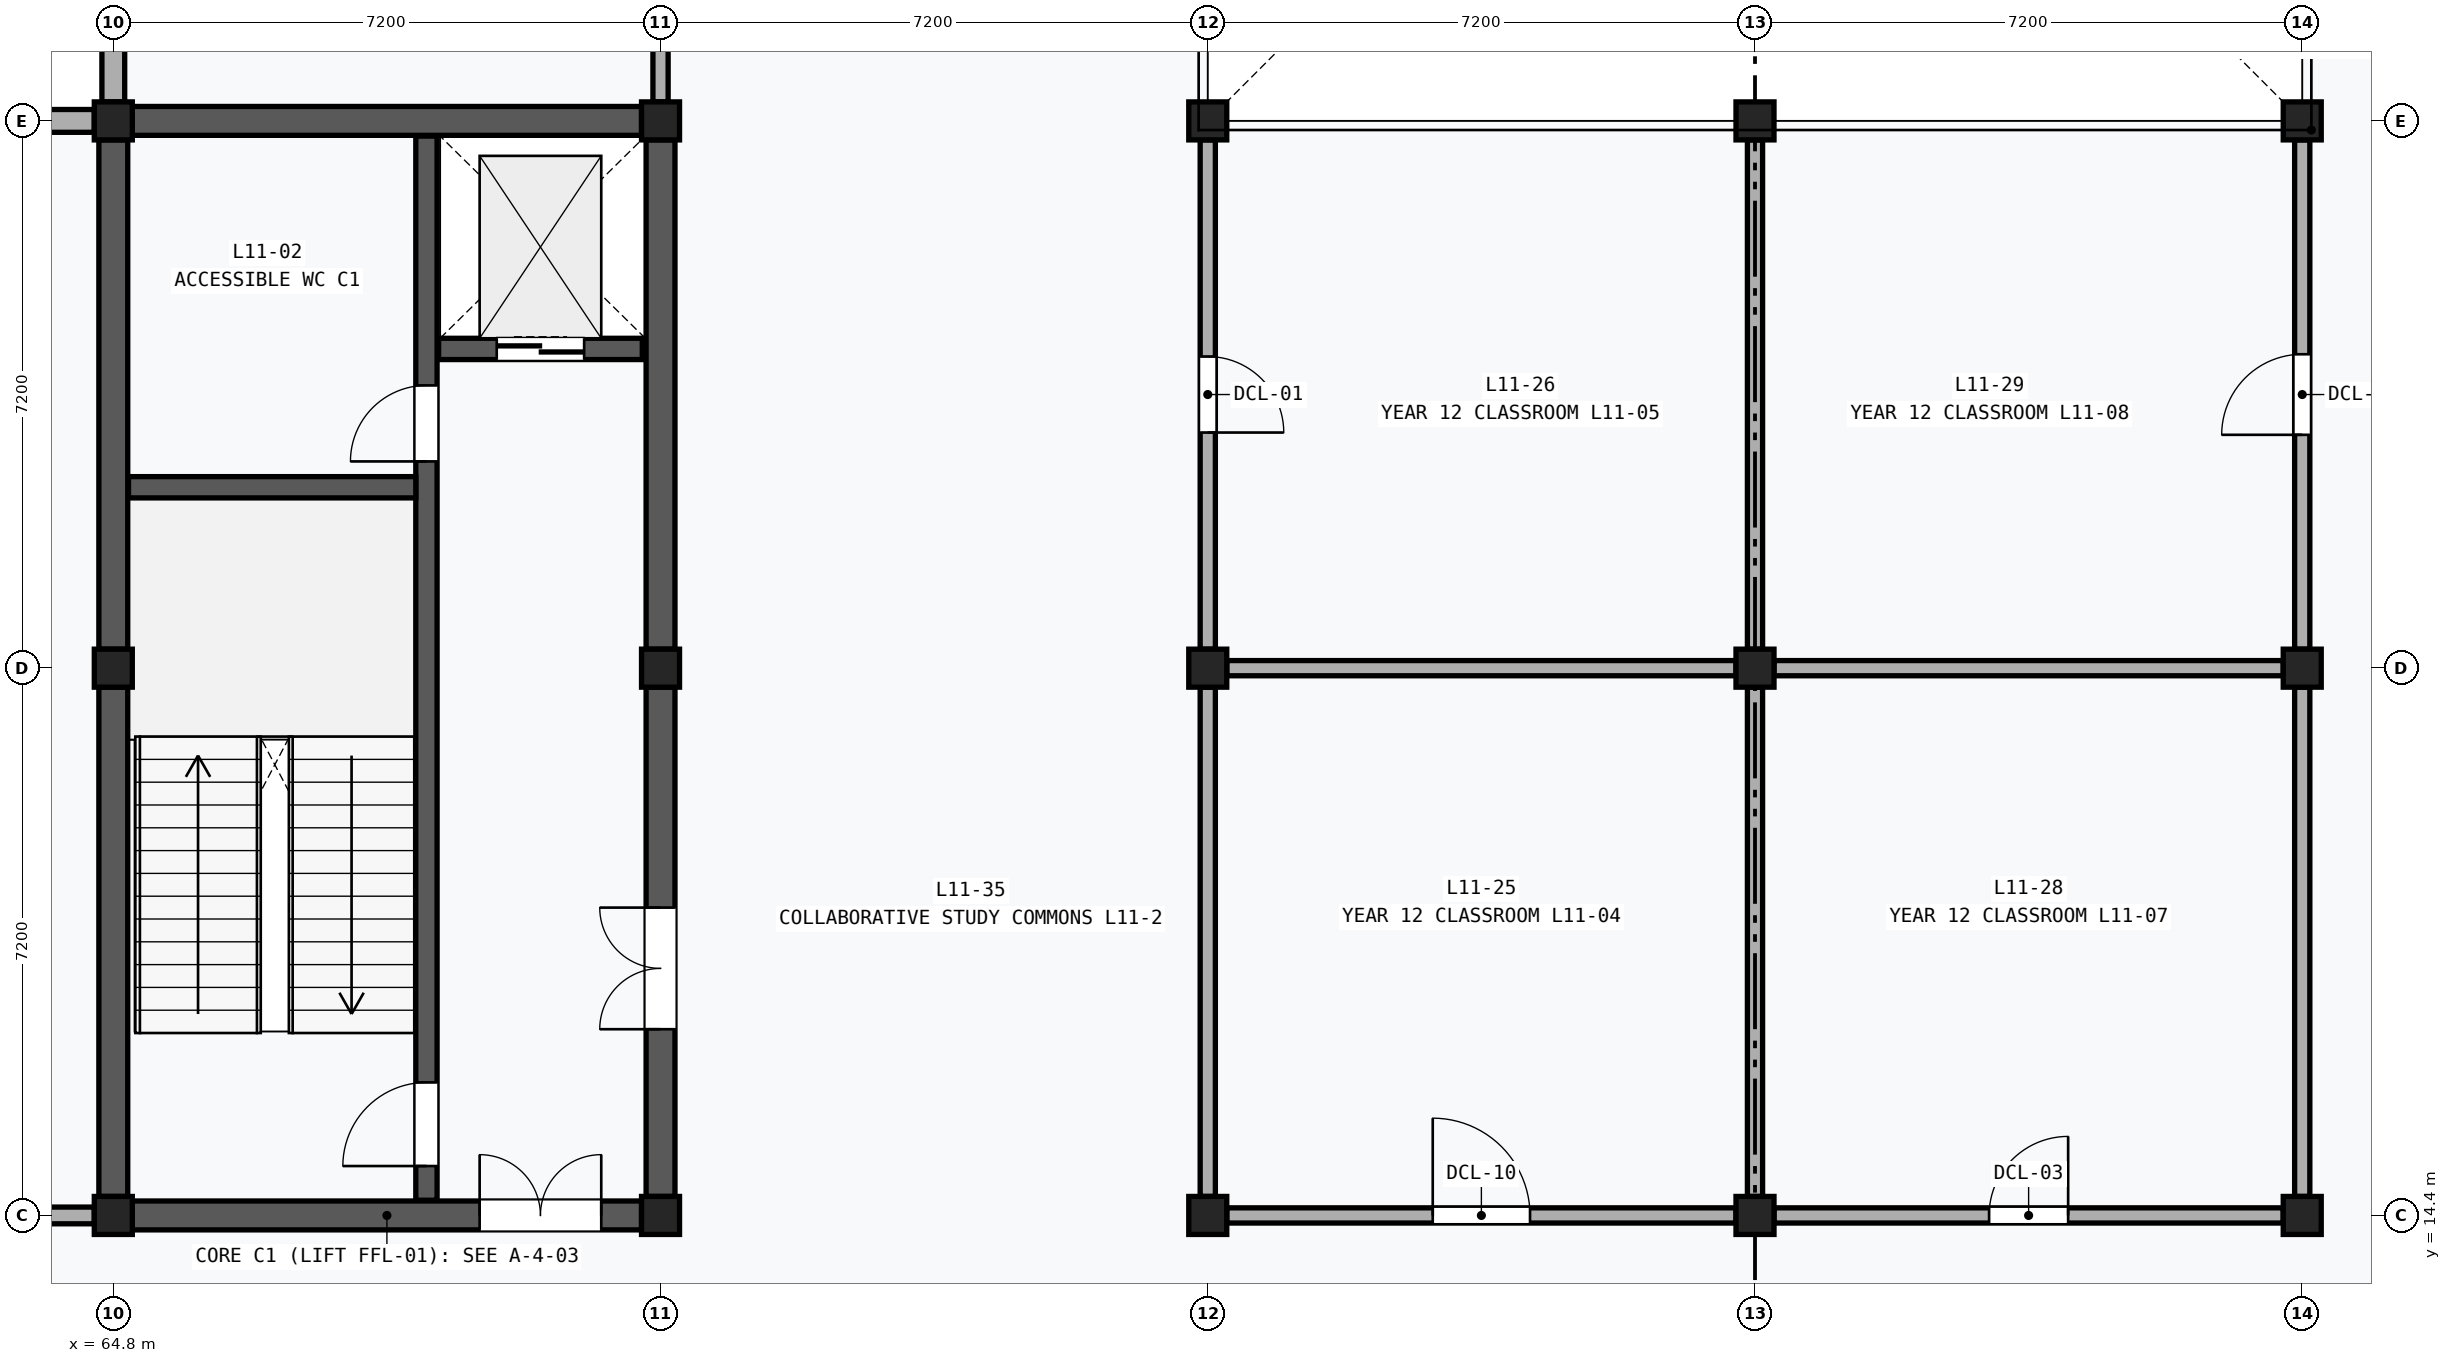
"""IFC4 building model, lengths in metres.
Left out: names, types, materials, properties, quantities, classifications, styles, units other than length and angle.
Written with IfcOpenShell. Run it as: python <this file> out.ifc"""

import sys

from ifc_helpers import new_model, si_unit, direction, frame, frame_2d, origin, origin_2d, place, context, subcontext, project, spatial, rectangle, extrude, element, fill, save


model = new_model("IFC4")
c1 = context("Model", 3, precision=1e-05, world=origin(), true_north=direction((0.0, 1.0)))
c2 = subcontext(c1, "Body", "Model", "MODEL_VIEW")
j1 = project(units=[si_unit("LENGTHUNIT", "METRE"), si_unit("PLANEANGLEUNIT", "RADIAN")], contexts=[c1])
p1 = place(None, origin())
s1 = spatial("IfcSite", under=j1, at=p1, CompositionType="ELEMENT")
p2 = place(p1, origin())
s2 = spatial("IfcBuilding", under=s1, at=p2, CompositionType="ELEMENT")
p3 = place(p2, frame((0.0, 0.0, 46.8)))
s3 = spatial("IfcBuildingStorey", under=s2, at=p3, CompositionType="ELEMENT", Elevation=46.8)
for number, where, z_axis, x_axis in (
    (1, (64.8, 14.4, 0.0), (0.0, 0.0, 1.0), (1.0, 0.0, 0.0)),
    (2, (64.8, 21.6, 0.0), (0.0, 0.0, 1.0), (1.0, 0.0, 0.0)),
    (3, (64.8, 28.8, 0.0), (0.0, 0.0, 1.0), (1.0, 0.0, 0.0)),
    (4, (72.0, 14.4, 0.0), (0.0, 0.0, 1.0), (1.0, 0.0, 0.0)),
    (5, (72.0, 21.6, 0.0), (0.0, 0.0, 1.0), (1.0, 0.0, 0.0)),
    (6, (72.0, 28.8, 0.0), (0.0, 0.0, 1.0), (1.0, 0.0, 0.0)),
    (7, (79.2, 14.4, 0.0), (0.0, 0.0, 1.0), (1.0, 0.0, 0.0)),
    (8, (79.2, 21.6, 0.0), (0.0, 0.0, 1.0), (1.0, 0.0, 0.0)),
    (9, (79.2, 28.8, 0.0), (0.0, 0.0, 1.0), (1.0, 0.0, 0.0)),
    (10, (86.4, 14.4, 0.0), (0.0, 0.0, 1.0), (1.0, 0.0, 0.0)),
    (11, (86.4, 21.6, 0.0), (0.0, 0.0, 1.0), (1.0, 0.0, 0.0)),
    (12, (86.4, 28.8, 0.0), (0.0, 0.0, 1.0), (1.0, 0.0, 0.0)),
    (13, (93.6, 14.4, 0.0), (0.0, 0.0, 1.0), (1.0, 0.0, 0.0)),
    (14, (93.6, 21.6, 0.0), (0.0, 0.0, 1.0), (1.0, 0.0, 0.0)),
    (15, (93.6, 28.8, 0.0), (0.0, 0.0, 1.0), (1.0, 0.0, 0.0)),
):
    element("IfcColumn", number, at=place(p3, frame(where, z_axis=z_axis, x_axis=x_axis)), inside=s3, PredefinedType="COLUMN", context=c2, shape_type="SweptSolid", body=[
        extrude(rectangle(XDim=0.5, YDim=0.5, at=origin_2d()), origin(), (0.0, 0.0, 1.0), 4.2),
    ])
p4 = place(p3, frame((57.78, 28.8, 0.0), z_axis=(0.0, 0.0, 1.0), x_axis=(1.0, 0.0, 0.0)))
e16 = element("IfcWall", 16, at=p4, inside=s3, PredefinedType="SOLIDWALL", context=c2, shape_type="SweptSolid", body=[
    extrude(rectangle(XDim=6.77, YDim=0.3, at=frame_2d((3.385, 0.0))), origin(), (0.0, 0.0, 1.0), 3.37),
])
p5 = place(p4, frame((2.185, 0.0, 0.7)))
e17 = element("IfcOpeningElement", 17, at=p5, cuts=e16, PredefinedType="OPENING", context=c2, shape_type="SweptSolid", body=[
    extrude(rectangle(XDim=2.4, YDim=2.2, at=frame_2d((1.2, 1.1))), frame((0.0, 0.162, 0.0), z_axis=(0.0, -1.0, 0.0), x_axis=(1.0, 0.0, 0.0)), (0.0, 0.0, 1.0), 0.324),
])
p6 = place(p3, frame((64.8, 29.05, 0.0), z_axis=(0.0, 0.0, 1.0), x_axis=(0.0, 1.0, 0.0)))
e18 = element("IfcWall", 18, at=p6, inside=s3, PredefinedType="SOLIDWALL", context=c2, shape_type="SweptSolid", body=[
    extrude(rectangle(XDim=6.7, YDim=0.3, at=frame_2d((3.35, 0.0))), origin(), (0.0, 0.0, 1.0), 3.37),
])
p7 = place(p3, frame((64.8, 14.65, 0.0), z_axis=(0.0, 0.0, 1.0), x_axis=(0.0, 1.0, 0.0)))
e19 = element("IfcWall", 19, at=p7, inside=s3, PredefinedType="SHEAR", context=c2, shape_type="SweptSolid", body=[
    extrude(rectangle(XDim=6.7, YDim=0.38, at=frame_2d((3.35, 0.0))), origin(), (0.0, 0.0, 1.0), 3.29),
])
p8 = place(p3, frame((64.8, 21.85, 0.0), z_axis=(0.0, 0.0, 1.0), x_axis=(0.0, 1.0, 0.0)))
e20 = element("IfcWall", 20, at=p8, inside=s3, PredefinedType="SHEAR", context=c2, shape_type="SweptSolid", body=[
    extrude(rectangle(XDim=6.7, YDim=0.38, at=frame_2d((3.35, 0.0))), origin(), (0.0, 0.0, 1.0), 3.29),
])
p9 = place(p3, frame((72.0, 14.65, 0.0), z_axis=(0.0, 0.0, 1.0), x_axis=(0.0, 1.0, 0.0)))
e21 = element("IfcWall", 21, at=p9, inside=s3, PredefinedType="SHEAR", context=c2, shape_type="SweptSolid", body=[
    extrude(rectangle(XDim=6.7, YDim=0.38, at=frame_2d((3.35, 0.0))), origin(), (0.0, 0.0, 1.0), 3.29),
])
p10 = place(p9, frame((2.2, 0.0, 0.0)))
e22 = element("IfcOpeningElement", 22, at=p10, cuts=e21, PredefinedType="OPENING", context=c2, shape_type="SweptSolid", body=[
    extrude(rectangle(XDim=1.6, YDim=2.2, at=frame_2d((0.8, 1.1))), frame((0.0, 0.202, 0.0), z_axis=(0.0, -1.0, 0.0), x_axis=(1.0, 0.0, 0.0)), (0.0, 0.0, 1.0), 0.404),
])
p11 = place(p3, frame((72.0, 21.85, 0.0), z_axis=(0.0, 0.0, 1.0), x_axis=(0.0, 1.0, 0.0)))
e23 = element("IfcWall", 23, at=p11, inside=s3, PredefinedType="SHEAR", context=c2, shape_type="SweptSolid", body=[
    extrude(rectangle(XDim=6.7, YDim=0.38, at=frame_2d((3.35, 0.0))), origin(), (0.0, 0.0, 1.0), 3.29),
])
p12 = place(p3, frame((65.05, 14.4, 0.0), z_axis=(0.0, 0.0, 1.0), x_axis=(1.0, 0.0, 0.0)))
e24 = element("IfcWall", 24, at=p12, inside=s3, PredefinedType="SHEAR", context=c2, shape_type="SweptSolid", body=[
    extrude(rectangle(XDim=6.7, YDim=0.38, at=frame_2d((3.35, 0.0))), origin(), (0.0, 0.0, 1.0), 3.29),
])
p13 = place(p12, frame((4.57, 0.0, 0.0)))
e25 = element("IfcOpeningElement", 25, at=p13, cuts=e24, PredefinedType="OPENING", context=c2, shape_type="SweptSolid", body=[
    extrude(rectangle(XDim=1.6, YDim=2.2, at=frame_2d((0.8, 1.1))), frame((0.0, 0.202, 0.0), z_axis=(0.0, -1.0, 0.0), x_axis=(1.0, 0.0, 0.0)), (0.0, 0.0, 1.0), 0.404),
])
p14 = place(p3, frame((65.05, 28.8, 0.0), z_axis=(0.0, 0.0, 1.0), x_axis=(1.0, 0.0, 0.0)))
e26 = element("IfcWall", 26, at=p14, inside=s3, PredefinedType="SHEAR", context=c2, shape_type="SweptSolid", body=[
    extrude(rectangle(XDim=6.7, YDim=0.38, at=frame_2d((3.35, 0.0))), origin(), (0.0, 0.0, 1.0), 3.29),
])
p15 = place(p3, frame((68.92, 14.6, 0.0), z_axis=(0.0, 0.0, 1.0), x_axis=(0.0, 1.0, 0.0)))
e27 = element("IfcWall", 27, at=p15, inside=s3, PredefinedType="SHEAR", context=c2, shape_type="SweptSolid", body=[
    extrude(rectangle(XDim=14.0, YDim=0.28, at=frame_2d((7.0, 0.0))), origin(), (0.0, 0.0, 1.0), 3.97),
])
p16 = place(p15, frame((0.45, 0.0, 0.0)))
e28 = element("IfcOpeningElement", 28, at=p16, cuts=e27, PredefinedType="OPENING", context=c2, shape_type="SweptSolid", body=[
    extrude(rectangle(XDim=1.1, YDim=2.15, at=frame_2d((0.55, 1.075))), frame((0.0, 0.152, 0.0), z_axis=(0.0, -1.0, 0.0), x_axis=(1.0, 0.0, 0.0)), (0.0, 0.0, 1.0), 0.304),
])
p17 = place(p15, frame((9.72, 0.0, 0.0)))
e29 = element("IfcOpeningElement", 29, at=p17, cuts=e27, PredefinedType="OPENING", context=c2, shape_type="SweptSolid", body=[
    extrude(rectangle(XDim=1.0, YDim=2.15, at=frame_2d((0.5, 1.075))), frame((0.0, 0.152, 0.0), z_axis=(0.0, -1.0, 0.0), x_axis=(1.0, 0.0, 0.0)), (0.0, 0.0, 1.0), 0.304),
])
p18 = place(p3, frame((65.0, 23.98, 0.0), z_axis=(0.0, 0.0, 1.0), x_axis=(1.0, 0.0, 0.0)))
e30 = element("IfcWall", 30, at=p18, inside=s3, PredefinedType="SHEAR", context=c2, shape_type="SweptSolid", body=[
    extrude(rectangle(XDim=3.78, YDim=0.28, at=frame_2d((1.89, 0.0))), origin(), (0.0, 0.0, 1.0), 3.97),
])
p19 = place(p3, frame((69.08, 25.8, 0.0), z_axis=(0.0, 0.0, 1.0), x_axis=(1.0, 0.0, 0.0)))
e31 = element("IfcWall", 31, at=p19, inside=s3, PredefinedType="SHEAR", context=c2, shape_type="SweptSolid", body=[
    extrude(rectangle(XDim=2.68, YDim=0.28, at=frame_2d((1.34, 0.0))), origin(), (0.0, 0.0, 1.0), 3.97),
])
p20 = place(p19, frame((0.765, 0.0, 0.0)))
e32 = element("IfcOpeningElement", 32, at=p20, cuts=e31, PredefinedType="OPENING", context=c2, shape_type="SweptSolid", body=[
    extrude(rectangle(XDim=1.15, YDim=2.2, at=frame_2d((0.575, 1.1))), frame((0.0, 0.152, 0.0), z_axis=(0.0, -1.0, 0.0), x_axis=(1.0, 0.0, 0.0)), (0.0, 0.0, 1.0), 0.304),
])
p21 = place(p3, frame((57.85, 14.4, 0.0), z_axis=(0.0, 0.0, 1.0), x_axis=(1.0, 0.0, 0.0)))
e33 = element("IfcWall", 33, at=p21, inside=s3, PredefinedType="PARTITIONING", context=c2, shape_type="SweptSolid", body=[
    extrude(rectangle(XDim=6.7, YDim=0.22, at=frame_2d((3.35, 0.0))), origin(), (0.0, 0.0, 1.0), 3.29),
])
p22 = place(p21, frame((2.79, 0.0, 0.0)))
e34 = element("IfcOpeningElement", 34, at=p22, cuts=e33, PredefinedType="OPENING", context=c2, shape_type="SweptSolid", body=[
    extrude(rectangle(XDim=1.12, YDim=2.2, at=frame_2d((0.56, 1.1))), frame((0.0, 0.122, 0.0), z_axis=(0.0, -1.0, 0.0), x_axis=(1.0, 0.0, 0.0)), (0.0, 0.0, 1.0), 0.244),
])
p23 = place(p3, frame((72.0, 29.05, 0.0), z_axis=(0.0, 0.0, 1.0), x_axis=(0.0, 1.0, 0.0)))
e35 = element("IfcWall", 35, at=p23, inside=s3, PredefinedType="PARTITIONING", context=c2, shape_type="SweptSolid", body=[
    extrude(rectangle(XDim=6.7, YDim=0.2, at=frame_2d((3.35, 0.0))), origin(), (0.0, 0.0, 1.0), 3.29),
])
p24 = place(p23, frame((2.77, 0.0, 0.0)))
e36 = element("IfcOpeningElement", 36, at=p24, cuts=e35, PredefinedType="OPENING", context=c2, shape_type="SweptSolid", body=[
    extrude(rectangle(XDim=1.16, YDim=2.22, at=frame_2d((0.58, 1.11))), frame((0.0, 0.112, 0.0), z_axis=(0.0, -1.0, 0.0), x_axis=(1.0, 0.0, 0.0)), (0.0, 0.0, 1.0), 0.224),
])
p25 = place(p3, frame((79.45, 14.4, 0.0), z_axis=(0.0, 0.0, 1.0), x_axis=(1.0, 0.0, 0.0)))
e37 = element("IfcWall", 37, at=p25, inside=s3, PredefinedType="PARTITIONING", context=c2, shape_type="SweptSolid", body=[
    extrude(rectangle(XDim=6.7, YDim=0.2, at=frame_2d((3.35, 0.0))), origin(), (0.0, 0.0, 1.0), 3.29),
])
p26 = place(p25, frame((2.71, 0.0, 0.0)))
e38 = element("IfcOpeningElement", 38, at=p26, cuts=e37, PredefinedType="OPENING", context=c2, shape_type="SweptSolid", body=[
    extrude(rectangle(XDim=1.28, YDim=2.28, at=frame_2d((0.64, 1.14))), frame((0.0, 0.112, 0.0), z_axis=(0.0, -1.0, 0.0), x_axis=(1.0, 0.0, 0.0)), (0.0, 0.0, 1.0), 0.224),
])
p27 = place(p3, frame((79.45, 21.6, 0.0), z_axis=(0.0, 0.0, 1.0), x_axis=(1.0, 0.0, 0.0)))
e39 = element("IfcWall", 39, at=p27, inside=s3, PredefinedType="PARTITIONING", context=c2, shape_type="SweptSolid", body=[
    extrude(rectangle(XDim=6.7, YDim=0.2, at=frame_2d((3.35, 0.0))), origin(), (0.0, 0.0, 1.0), 3.29),
])
for number, where, z_axis, x_axis in (
    (40, (79.2, 14.65, 0.0), (0.0, 0.0, 1.0), (0.0, 1.0, 0.0)),
    (41, (86.4, 14.65, 0.0), (0.0, 0.0, 1.0), (0.0, 1.0, 0.0)),
):
    element("IfcWall", number, at=place(p3, frame(where, z_axis=z_axis, x_axis=x_axis)), inside=s3, PredefinedType="PARTITIONING", context=c2, shape_type="SweptSolid", body=[
        extrude(rectangle(XDim=6.7, YDim=0.2, at=frame_2d((3.35, 0.0))), origin(), (0.0, 0.0, 1.0), 3.29),
    ])
p28 = place(p3, frame((79.2, 21.85, 0.0), z_axis=(0.0, 0.0, 1.0), x_axis=(0.0, 1.0, 0.0)))
e42 = element("IfcWall", 42, at=p28, inside=s3, PredefinedType="PARTITIONING", context=c2, shape_type="SweptSolid", body=[
    extrude(rectangle(XDim=6.7, YDim=0.2, at=frame_2d((3.35, 0.0))), origin(), (0.0, 0.0, 1.0), 3.29),
])
p29 = place(p28, frame((2.85, 0.0, 0.0)))
e43 = element("IfcOpeningElement", 43, at=p29, cuts=e42, PredefinedType="OPENING", context=c2, shape_type="SweptSolid", body=[
    extrude(rectangle(XDim=1.0, YDim=2.1, at=frame_2d((0.5, 1.05))), frame((0.0, 0.112, 0.0), z_axis=(0.0, -1.0, 0.0), x_axis=(1.0, 0.0, 0.0)), (0.0, 0.0, 1.0), 0.224),
])
p30 = place(p3, frame((86.4, 21.85, 0.0), z_axis=(0.0, 0.0, 1.0), x_axis=(0.0, 1.0, 0.0)))
e44 = element("IfcWall", 44, at=p30, inside=s3, PredefinedType="PARTITIONING", context=c2, shape_type="SweptSolid", body=[
    extrude(rectangle(XDim=6.7, YDim=0.2, at=frame_2d((3.35, 0.0))), origin(), (0.0, 0.0, 1.0), 3.29),
])
p31 = place(p3, frame((86.65, 14.4, 0.0), z_axis=(0.0, 0.0, 1.0), x_axis=(1.0, 0.0, 0.0)))
e45 = element("IfcWall", 45, at=p31, inside=s3, PredefinedType="PARTITIONING", context=c2, shape_type="SweptSolid", body=[
    extrude(rectangle(XDim=6.7, YDim=0.2, at=frame_2d((3.35, 0.0))), origin(), (0.0, 0.0, 1.0), 3.29),
])
p32 = place(p31, frame((2.83, 0.0, 0.0)))
e46 = element("IfcOpeningElement", 46, at=p32, cuts=e45, PredefinedType="OPENING", context=c2, shape_type="SweptSolid", body=[
    extrude(rectangle(XDim=1.04, YDim=2.14, at=frame_2d((0.52, 1.07))), frame((0.0, 0.112, 0.0), z_axis=(0.0, -1.0, 0.0), x_axis=(1.0, 0.0, 0.0)), (0.0, 0.0, 1.0), 0.224),
])
for number, where, z_axis, x_axis in (
    (47, (86.65, 21.6, 0.0), (0.0, 0.0, 1.0), (1.0, 0.0, 0.0)),
    (48, (93.6, 14.65, 0.0), (0.0, 0.0, 1.0), (0.0, 1.0, 0.0)),
):
    element("IfcWall", number, at=place(p3, frame(where, z_axis=z_axis, x_axis=x_axis)), inside=s3, PredefinedType="PARTITIONING", context=c2, shape_type="SweptSolid", body=[
        extrude(rectangle(XDim=6.7, YDim=0.2, at=frame_2d((3.35, 0.0))), origin(), (0.0, 0.0, 1.0), 3.29),
    ])
p33 = place(p3, frame((93.6, 21.85, 0.0), z_axis=(0.0, 0.0, 1.0), x_axis=(0.0, 1.0, 0.0)))
e49 = element("IfcWall", 49, at=p33, inside=s3, PredefinedType="PARTITIONING", context=c2, shape_type="SweptSolid", body=[
    extrude(rectangle(XDim=6.7, YDim=0.2, at=frame_2d((3.35, 0.0))), origin(), (0.0, 0.0, 1.0), 3.29),
])
p34 = place(p33, frame((2.82, 0.0, 0.0)))
e50 = element("IfcOpeningElement", 50, at=p34, cuts=e49, PredefinedType="OPENING", context=c2, shape_type="SweptSolid", body=[
    extrude(rectangle(XDim=1.06, YDim=2.16, at=frame_2d((0.53, 1.08))), frame((0.0, 0.112, 0.0), z_axis=(0.0, -1.0, 0.0), x_axis=(1.0, 0.0, 0.0)), (0.0, 0.0, 1.0), 0.224),
])
p35 = place(p10, origin())
e51 = element("IfcDoor", 51, at=p35, inside=s3, OperationType="DOUBLE_DOOR_SINGLE_SWING", PredefinedType="DOOR", context=c2, shape_type="SweptSolid", body=[
    extrude(rectangle(XDim=1.6, YDim=2.2, at=frame_2d((0.8, 1.1))), frame((0.0, 0.025, 0.0), z_axis=(0.0, -1.0, 0.0), x_axis=(1.0, 0.0, 0.0)), (0.0, 0.0, 1.0), 0.05),
])
fill(e22, e51)
p36 = place(p13, origin())
e52 = element("IfcDoor", 52, at=p36, inside=s3, OperationType="DOUBLE_DOOR_SINGLE_SWING", PredefinedType="DOOR", context=c2, shape_type="SweptSolid", body=[
    extrude(rectangle(XDim=1.6, YDim=2.2, at=frame_2d((0.8, 1.1))), frame((0.0, 0.025, 0.0), z_axis=(0.0, -1.0, 0.0), x_axis=(1.0, 0.0, 0.0)), (0.0, 0.0, 1.0), 0.05),
])
fill(e25, e52)
p37 = place(p16, origin())
e53 = element("IfcDoor", 53, at=p37, inside=s3, OperationType="SINGLE_SWING_LEFT", PredefinedType="DOOR", context=c2, shape_type="SweptSolid", body=[
    extrude(rectangle(XDim=1.1, YDim=2.15, at=frame_2d((0.55, 1.075))), frame((0.0, 0.025, 0.0), z_axis=(0.0, -1.0, 0.0), x_axis=(1.0, 0.0, 0.0)), (0.0, 0.0, 1.0), 0.05),
])
fill(e28, e53)
p38 = place(p17, origin())
e54 = element("IfcDoor", 54, at=p38, inside=s3, OperationType="SINGLE_SWING_LEFT", PredefinedType="DOOR", context=c2, shape_type="SweptSolid", body=[
    extrude(rectangle(XDim=1.0, YDim=2.15, at=frame_2d((0.5, 1.075))), frame((0.0, 0.025, 0.0), z_axis=(0.0, -1.0, 0.0), x_axis=(1.0, 0.0, 0.0)), (0.0, 0.0, 1.0), 0.05),
])
fill(e29, e54)
p39 = place(p20, frame((1.15, 0.0, 0.0), z_axis=(0.0, 0.0, 1.0), x_axis=(-1.0, 0.0, 0.0)))
e55 = element("IfcDoor", 55, at=p39, inside=s3, OperationType="DOUBLE_DOOR_SLIDING", PredefinedType="DOOR", context=c2, shape_type="SweptSolid", body=[
    extrude(rectangle(XDim=1.15, YDim=2.2, at=frame_2d((0.575, 1.1))), frame((0.0, 0.025, 0.0), z_axis=(0.0, -1.0, 0.0), x_axis=(1.0, 0.0, 0.0)), (0.0, 0.0, 1.0), 0.05),
])
fill(e32, e55)
p40 = place(p26, origin())
e56 = element("IfcDoor", 56, at=p40, inside=s3, OperationType="SINGLE_SWING_LEFT", PredefinedType="DOOR", context=c2, shape_type="SweptSolid", body=[
    extrude(rectangle(XDim=1.28, YDim=2.28, at=frame_2d((0.64, 1.14))), frame((0.0, 0.025, 0.0), z_axis=(0.0, -1.0, 0.0), x_axis=(1.0, 0.0, 0.0)), (0.0, 0.0, 1.0), 0.05),
])
fill(e38, e56)
p41 = place(p29, frame((1.0, 0.0, 0.0), z_axis=(0.0, 0.0, 1.0), x_axis=(-1.0, 0.0, 0.0)))
e57 = element("IfcDoor", 57, at=p41, inside=s3, OperationType="SINGLE_SWING_RIGHT", PredefinedType="DOOR", context=c2, shape_type="SweptSolid", body=[
    extrude(rectangle(XDim=1.0, YDim=2.1, at=frame_2d((0.5, 1.05))), frame((0.0, 0.025, 0.0), z_axis=(0.0, -1.0, 0.0), x_axis=(1.0, 0.0, 0.0)), (0.0, 0.0, 1.0), 0.05),
])
fill(e43, e57)
p42 = place(p32, origin())
e58 = element("IfcDoor", 58, at=p42, inside=s3, OperationType="SINGLE_SWING_RIGHT", PredefinedType="DOOR", context=c2, shape_type="SweptSolid", body=[
    extrude(rectangle(XDim=1.04, YDim=2.14, at=frame_2d((0.52, 1.07))), frame((0.0, 0.025, 0.0), z_axis=(0.0, -1.0, 0.0), x_axis=(1.0, 0.0, 0.0)), (0.0, 0.0, 1.0), 0.05),
])
fill(e46, e58)
p43 = place(p34, origin())
e59 = element("IfcDoor", 59, at=p43, inside=s3, OperationType="SINGLE_SWING_LEFT", PredefinedType="DOOR", context=c2, shape_type="SweptSolid", body=[
    extrude(rectangle(XDim=1.06, YDim=2.16, at=frame_2d((0.53, 1.08))), frame((0.0, 0.025, 0.0), z_axis=(0.0, -1.0, 0.0), x_axis=(1.0, 0.0, 0.0)), (0.0, 0.0, 1.0), 0.05),
])
fill(e50, e59)
save(model, sys.argv[1])
